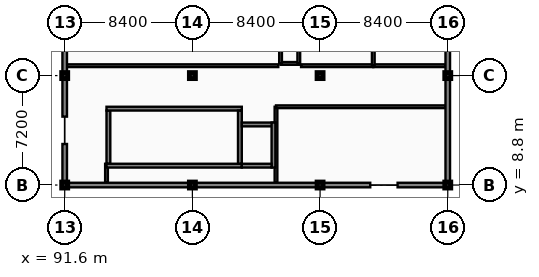
"""IFC4 building model, lengths in metres.
Left out: names, types, materials, properties, quantities, classifications, styles, units other than length and angle.
Written with IfcOpenShell. Run it as: python <this file> out.ifc"""

import sys

from ifc_helpers import new_model, si_unit, direction, frame, frame_2d, origin, origin_2d, place, context, subcontext, project, spatial, rectangle, extrude, element, fill, save


model = new_model("IFC4")
c1 = context("Model", 3, precision=1e-05, world=origin(), true_north=direction((0.0, 1.0)))
c2 = subcontext(c1, "Body", "Model", "MODEL_VIEW")
j1 = project(units=[si_unit("LENGTHUNIT", "METRE"), si_unit("PLANEANGLEUNIT", "RADIAN")], contexts=[c1])
p1 = place(None, origin())
s1 = spatial("IfcSite", under=j1, at=p1, CompositionType="ELEMENT")
p2 = place(p1, origin())
s2 = spatial("IfcBuilding", under=s1, at=p2, CompositionType="ELEMENT")
p3 = place(p2, frame((0.0, 0.0, 9.6)))
s3 = spatial("IfcBuildingStorey", under=s2, at=p3, CompositionType="ELEMENT", Elevation=9.6)
for number, where, z_axis, x_axis in (
    (1, (91.6, 8.8, 0.0), (0.0, 0.0, 1.0), (1.0, 0.0, 0.0)),
    (2, (91.6, 16.0, 0.0), (0.0, 0.0, 1.0), (1.0, 0.0, 0.0)),
    (3, (100.0, 8.8, 0.0), (0.0, 0.0, 1.0), (1.0, 0.0, 0.0)),
    (4, (100.0, 16.0, 0.0), (0.0, 0.0, 1.0), (1.0, 0.0, 0.0)),
    (5, (108.4, 8.8, 0.0), (0.0, 0.0, 1.0), (1.0, 0.0, 0.0)),
    (6, (108.4, 16.0, 0.0), (0.0, 0.0, 1.0), (1.0, 0.0, 0.0)),
    (7, (116.8, 8.8, 0.0), (0.0, 0.0, 1.0), (1.0, 0.0, 0.0)),
    (8, (116.8, 16.0, 0.0), (0.0, 0.0, 1.0), (1.0, 0.0, 0.0)),
):
    element("IfcColumn", number, at=place(p3, frame(where, z_axis=z_axis, x_axis=x_axis)), inside=s3, PredefinedType="COLUMN", context=c2, shape_type="SweptSolid", body=[
        extrude(rectangle(XDim=0.4, YDim=0.4, at=origin_2d()), origin(), (0.0, 0.0, 1.0), 4.2),
    ])
p4 = place(p3, frame((94.35, 8.96, 0.0), z_axis=(0.0, 0.0, 1.0), x_axis=(0.0, 1.0, 0.0)))
e9 = element("IfcWall", 9, at=p4, inside=s3, PredefinedType="PARTITIONING", context=c2, shape_type="SweptSolid", body=[
    extrude(rectangle(XDim=1.24, YDim=0.18, at=frame_2d((0.62, 0.0))), origin(), (0.0, 0.0, 1.0), 3.59),
])
p5 = place(p3, frame((105.5, 8.94, 0.0), z_axis=(0.0, 0.0, 1.0), x_axis=(0.0, 1.0, 0.0)))
e10 = element("IfcWall", 10, at=p5, inside=s3, PredefinedType="PARTITIONING", context=c2, shape_type="SweptSolid", body=[
    extrude(rectangle(XDim=5.01, YDim=0.18, at=frame_2d((2.505, 0.0))), origin(), (0.0, 0.0, 1.0), 3.59),
])
p6 = place(p3, frame((105.5, 13.95, 0.0), z_axis=(0.0, 0.0, 1.0), x_axis=(1.0, 0.0, 0.0)))
e11 = element("IfcWall", 11, at=p6, inside=s3, PredefinedType="PARTITIONING", context=c2, shape_type="SweptSolid", body=[
    extrude(rectangle(XDim=11.16, YDim=0.18, at=frame_2d((5.58, 0.0))), origin(), (0.0, 0.0, 1.0), 3.47),
])
p7 = place(p6, frame((5.08, 0.0, -0.01)))
e12 = element("IfcOpeningElement", 12, at=p7, cuts=e11, PredefinedType="OPENING", context=c2, shape_type="SweptSolid", body=[
    extrude(rectangle(XDim=1.0, YDim=2.16, at=frame_2d((0.5, 1.08))), frame((0.0, 0.1, 0.0), z_axis=(0.0, -1.0, 0.0), x_axis=(1.0, 0.0, 0.0)), (0.0, 0.0, 1.0), 0.2),
])
p8 = place(p3, frame((91.74, 16.65, 0.0), z_axis=(0.0, 0.0, 1.0), x_axis=(1.0, 0.0, 0.0)))
e13 = element("IfcWall", 13, at=p8, inside=s3, PredefinedType="PARTITIONING", context=c2, shape_type="SweptSolid", body=[
    extrude(rectangle(XDim=13.91, YDim=0.18, at=frame_2d((6.955, 0.0))), origin(), (0.0, 0.0, 1.0), 3.47),
])
p9 = place(p8, frame((5.54, 0.0, -0.01)))
e14 = element("IfcOpeningElement", 14, at=p9, cuts=e13, PredefinedType="OPENING", context=c2, shape_type="SweptSolid", body=[
    extrude(rectangle(XDim=1.6, YDim=2.21, at=frame_2d((0.8, 1.105))), frame((0.0, 0.1, 0.0), z_axis=(0.0, -1.0, 0.0), x_axis=(1.0, 0.0, 0.0)), (0.0, 0.0, 1.0), 0.2),
])
p10 = place(p3, frame((107.15, 16.65, 0.0), z_axis=(0.0, 0.0, 1.0), x_axis=(1.0, 0.0, 0.0)))
e15 = element("IfcWall", 15, at=p10, inside=s3, PredefinedType="PARTITIONING", context=c2, shape_type="SweptSolid", body=[
    extrude(rectangle(XDim=4.75, YDim=0.18, at=frame_2d((2.375, 0.0))), origin(), (0.0, 0.0, 1.0), 3.47),
])
p11 = place(p3, frame((111.9, 16.65, 0.0), z_axis=(0.0, 0.0, 1.0), x_axis=(1.0, 0.0, 0.0)))
e16 = element("IfcWall", 16, at=p11, inside=s3, PredefinedType="PARTITIONING", context=c2, shape_type="SweptSolid", body=[
    extrude(rectangle(XDim=4.76, YDim=0.18, at=frame_2d((2.38, 0.0))), origin(), (0.0, 0.0, 1.0), 3.59),
])
p12 = place(p11, frame((1.88, 0.0, -0.01)))
e17 = element("IfcOpeningElement", 17, at=p12, cuts=e16, PredefinedType="OPENING", context=c2, shape_type="SweptSolid", body=[
    extrude(rectangle(XDim=1.0, YDim=2.16, at=frame_2d((0.5, 1.08))), frame((0.0, 0.1, 0.0), z_axis=(0.0, -1.0, 0.0), x_axis=(1.0, 0.0, 0.0)), (0.0, 0.0, 1.0), 0.2),
])
p13 = place(p3, frame((111.9, 16.65, 0.0), z_axis=(0.0, 0.0, 1.0), x_axis=(0.0, 1.0, 0.0)))
e18 = element("IfcWall", 18, at=p13, inside=s3, PredefinedType="PARTITIONING", context=c2, shape_type="SweptSolid", body=[
    extrude(rectangle(XDim=6.41, YDim=0.18, at=frame_2d((3.205, 0.0))), origin(), (0.0, 0.0, 1.0), 3.63),
])
p14 = place(p3, frame((91.6, 8.8, 0.0), z_axis=(0.0, 0.0, 1.0), x_axis=(1.0, 0.0, 0.0)))
e19 = element("IfcWall", 19, at=p14, inside=s3, PredefinedType="SOLIDWALL", context=c2, shape_type="SweptSolid", body=[
    extrude(rectangle(XDim=8.4, YDim=0.3, at=frame_2d((4.2, 0.0))), origin(), (0.0, 0.0, 1.0), 3.59),
])
p15 = place(p14, frame((0.46, 0.0, 0.85)))
e20 = element("IfcOpeningElement", 20, at=p15, cuts=e19, PredefinedType="OPENING", context=c2, shape_type="SweptSolid", body=[
    extrude(rectangle(XDim=0.9, YDim=2.1, at=frame_2d((0.45, 1.05))), frame((0.0, 0.16, 0.0), z_axis=(0.0, -1.0, 0.0), x_axis=(1.0, 0.0, 0.0)), (0.0, 0.0, 1.0), 0.32),
])
p16 = place(p14, frame((6.86, 0.0, 0.85)))
e21 = element("IfcOpeningElement", 21, at=p16, cuts=e19, PredefinedType="OPENING", context=c2, shape_type="SweptSolid", body=[
    extrude(rectangle(XDim=0.9, YDim=2.1, at=frame_2d((0.45, 1.05))), frame((0.0, 0.16, 0.0), z_axis=(0.0, -1.0, 0.0), x_axis=(1.0, 0.0, 0.0)), (0.0, 0.0, 1.0), 0.32),
])
p17 = place(p3, frame((100.0, 8.8, 0.0), z_axis=(0.0, 0.0, 1.0), x_axis=(1.0, 0.0, 0.0)))
e22 = element("IfcWall", 22, at=p17, inside=s3, PredefinedType="SOLIDWALL", context=c2, shape_type="SweptSolid", body=[
    extrude(rectangle(XDim=8.4, YDim=0.3, at=frame_2d((4.2, 0.0))), origin(), (0.0, 0.0, 1.0), 3.47),
])
p18 = place(p17, frame((0.46, 0.0, 0.85)))
e23 = element("IfcOpeningElement", 23, at=p18, cuts=e22, PredefinedType="OPENING", context=c2, shape_type="SweptSolid", body=[
    extrude(rectangle(XDim=0.9, YDim=2.1, at=frame_2d((0.45, 1.05))), frame((0.0, 0.16, 0.0), z_axis=(0.0, -1.0, 0.0), x_axis=(1.0, 0.0, 0.0)), (0.0, 0.0, 1.0), 0.32),
])
p19 = place(p17, frame((6.86, 0.0, 0.85)))
e24 = element("IfcOpeningElement", 24, at=p19, cuts=e22, PredefinedType="OPENING", context=c2, shape_type="SweptSolid", body=[
    extrude(rectangle(XDim=0.9, YDim=2.1, at=frame_2d((0.45, 1.05))), frame((0.0, 0.16, 0.0), z_axis=(0.0, -1.0, 0.0), x_axis=(1.0, 0.0, 0.0)), (0.0, 0.0, 1.0), 0.32),
])
for number, where, z_axis, x_axis in (
    (25, (108.4, 8.8, 0.0), (0.0, 0.0, 1.0), (1.0, 0.0, 0.0)),
    (26, (113.5, 8.8, 0.0), (0.0, 0.0, 1.0), (1.0, 0.0, 0.0)),
):
    element("IfcWall", number, at=place(p3, frame(where, z_axis=z_axis, x_axis=x_axis)), inside=s3, PredefinedType="SOLIDWALL", context=c2, shape_type="SweptSolid", body=[
        extrude(rectangle(XDim=3.3, YDim=0.3, at=frame_2d((1.65, 0.0))), origin(), (0.0, 0.0, 1.0), 3.47),
    ])
for number, where, z_axis, x_axis in (
    (27, (91.6, 16.0, 0.0), (0.0, 0.0, 1.0), (0.0, -1.0, 0.0)),
    (28, (91.6, 11.5, 0.0), (0.0, 0.0, 1.0), (0.0, -1.0, 0.0)),
):
    element("IfcWall", number, at=place(p3, frame(where, z_axis=z_axis, x_axis=x_axis)), inside=s3, PredefinedType="SOLIDWALL", context=c2, shape_type="SweptSolid", body=[
        extrude(rectangle(XDim=2.7, YDim=0.3, at=frame_2d((1.35, 0.0))), origin(), (0.0, 0.0, 1.0), 3.27),
    ])
p20 = place(p3, frame((91.6, 23.2, 0.0), z_axis=(0.0, 0.0, 1.0), x_axis=(0.0, -1.0, 0.0)))
e29 = element("IfcWall", 29, at=p20, inside=s3, PredefinedType="SOLIDWALL", context=c2, shape_type="SweptSolid", body=[
    extrude(rectangle(XDim=7.2, YDim=0.3, at=frame_2d((3.6, 0.0))), origin(), (0.0, 0.0, 1.0), 3.27),
])
p21 = place(p20, frame((0.46, 0.0, 0.85)))
e30 = element("IfcOpeningElement", 30, at=p21, cuts=e29, PredefinedType="OPENING", context=c2, shape_type="SweptSolid", body=[
    extrude(rectangle(XDim=0.9, YDim=2.1, at=frame_2d((0.45, 1.05))), frame((0.0, 0.16, 0.0), z_axis=(0.0, -1.0, 0.0), x_axis=(1.0, 0.0, 0.0)), (0.0, 0.0, 1.0), 0.32),
])
p22 = place(p20, frame((5.26, 0.0, 0.85)))
e31 = element("IfcOpeningElement", 31, at=p22, cuts=e29, PredefinedType="OPENING", context=c2, shape_type="SweptSolid", body=[
    extrude(rectangle(XDim=0.9, YDim=2.1, at=frame_2d((0.45, 1.05))), frame((0.0, 0.16, 0.0), z_axis=(0.0, -1.0, 0.0), x_axis=(1.0, 0.0, 0.0)), (0.0, 0.0, 1.0), 0.32),
])
p23 = place(p3, frame((116.8, 8.8, 0.0), z_axis=(0.0, 0.0, 1.0), x_axis=(0.0, 1.0, 0.0)))
e32 = element("IfcWall", 32, at=p23, inside=s3, PredefinedType="SOLIDWALL", context=c2, shape_type="SweptSolid", body=[
    extrude(rectangle(XDim=7.2, YDim=0.3, at=frame_2d((3.6, 0.0))), origin(), (0.0, 0.0, 1.0), 3.27),
])
p24 = place(p23, frame((0.46, 0.0, 0.85)))
e33 = element("IfcOpeningElement", 33, at=p24, cuts=e32, PredefinedType="OPENING", context=c2, shape_type="SweptSolid", body=[
    extrude(rectangle(XDim=0.9, YDim=2.1, at=frame_2d((0.45, 1.05))), frame((0.0, 0.16, 0.0), z_axis=(0.0, -1.0, 0.0), x_axis=(1.0, 0.0, 0.0)), (0.0, 0.0, 1.0), 0.32),
])
p25 = place(p23, frame((5.66, 0.0, 0.85)))
e34 = element("IfcOpeningElement", 34, at=p25, cuts=e32, PredefinedType="OPENING", context=c2, shape_type="SweptSolid", body=[
    extrude(rectangle(XDim=0.9, YDim=2.1, at=frame_2d((0.45, 1.05))), frame((0.0, 0.16, 0.0), z_axis=(0.0, -1.0, 0.0), x_axis=(1.0, 0.0, 0.0)), (0.0, 0.0, 1.0), 0.32),
])
p26 = place(p3, frame((116.8, 16.0, 0.0), z_axis=(0.0, 0.0, 1.0), x_axis=(0.0, 1.0, 0.0)))
e35 = element("IfcWall", 35, at=p26, inside=s3, PredefinedType="SOLIDWALL", context=c2, shape_type="SweptSolid", body=[
    extrude(rectangle(XDim=7.2, YDim=0.3, at=frame_2d((3.6, 0.0))), origin(), (0.0, 0.0, 1.0), 3.27),
])
p27 = place(p26, frame((0.86, 0.0, 0.85)))
e36 = element("IfcOpeningElement", 36, at=p27, cuts=e35, PredefinedType="OPENING", context=c2, shape_type="SweptSolid", body=[
    extrude(rectangle(XDim=0.9, YDim=2.1, at=frame_2d((0.45, 1.05))), frame((0.0, 0.16, 0.0), z_axis=(0.0, -1.0, 0.0), x_axis=(1.0, 0.0, 0.0)), (0.0, 0.0, 1.0), 0.32),
])
p28 = place(p26, frame((5.66, 0.0, 0.85)))
e37 = element("IfcOpeningElement", 37, at=p28, cuts=e35, PredefinedType="OPENING", context=c2, shape_type="SweptSolid", body=[
    extrude(rectangle(XDim=0.9, YDim=2.1, at=frame_2d((0.45, 1.05))), frame((0.0, 0.16, 0.0), z_axis=(0.0, -1.0, 0.0), x_axis=(1.0, 0.0, 0.0)), (0.0, 0.0, 1.0), 0.32),
])
p29 = place(p3, frame((94.475, 13.7, 0.0), z_axis=(0.0, 0.0, 1.0), x_axis=(0.0, -1.0, 0.0)))
e38 = element("IfcWall", 38, at=p29, inside=s3, PredefinedType="SHEAR", context=c2, shape_type="SweptSolid", body=[
    extrude(rectangle(XDim=3.5, YDim=0.25, at=frame_2d((1.75, 0.0))), origin(), (0.0, 0.0, 1.0), 4.2),
])
p30 = place(p29, frame((1.1, 0.0, -0.01)))
e39 = element("IfcOpeningElement", 39, at=p30, cuts=e38, PredefinedType="OPENING", context=c2, shape_type="SweptSolid", body=[
    extrude(rectangle(XDim=1.3, YDim=2.16, at=frame_2d((0.65, 1.08))), frame((0.0, 0.135, 0.0), z_axis=(0.0, -1.0, 0.0), x_axis=(1.0, 0.0, 0.0)), (0.0, 0.0, 1.0), 0.27),
])
for number, where, z_axis, x_axis in (
    (40, (94.35, 10.075, 0.0), (0.0, 0.0, 1.0), (1.0, 0.0, 0.0)),
    (41, (94.35, 13.825, 0.0), (0.0, 0.0, 1.0), (1.0, 0.0, 0.0)),
):
    element("IfcWall", number, at=place(p3, frame(where, z_axis=z_axis, x_axis=x_axis)), inside=s3, PredefinedType="SHEAR", context=c2, shape_type="SweptSolid", body=[
        extrude(rectangle(XDim=8.9, YDim=0.25, at=frame_2d((4.45, 0.0))), origin(), (0.0, 0.0, 1.0), 4.2),
    ])
p31 = place(p3, frame((103.125, 10.2, 0.0), z_axis=(0.0, 0.0, 1.0), x_axis=(0.0, 1.0, 0.0)))
e42 = element("IfcWall", 42, at=p31, inside=s3, PredefinedType="SHEAR", context=c2, shape_type="SweptSolid", body=[
    extrude(rectangle(XDim=3.5, YDim=0.25, at=frame_2d((1.75, 0.0))), origin(), (0.0, 0.0, 1.0), 4.2),
])
p32 = place(p3, frame((103.25, 12.785, 0.0), z_axis=(0.0, 0.0, 1.0), x_axis=(1.0, 0.0, 0.0)))
e43 = element("IfcWall", 43, at=p32, inside=s3, PredefinedType="SHEAR", context=c2, shape_type="SweptSolid", body=[
    extrude(rectangle(XDim=2.21, YDim=0.25, at=frame_2d((1.105, 0.0))), origin(), (0.0, 0.0, 1.0), 4.2),
])
p33 = place(p3, frame((105.335, 9.95, 0.0), z_axis=(0.0, 0.0, 1.0), x_axis=(0.0, 1.0, 0.0)))
e44 = element("IfcWall", 44, at=p33, inside=s3, PredefinedType="SHEAR", context=c2, shape_type="SweptSolid", body=[
    extrude(rectangle(XDim=2.96, YDim=0.25, at=frame_2d((1.48, 0.0))), origin(), (0.0, 0.0, 1.0), 4.2),
])
p34 = place(p3, frame((103.25, 10.075, 0.0), z_axis=(0.0, 0.0, 1.0), x_axis=(1.0, 0.0, 0.0)))
e45 = element("IfcWall", 45, at=p34, inside=s3, PredefinedType="SHEAR", context=c2, shape_type="SweptSolid", body=[
    extrude(rectangle(XDim=1.96, YDim=0.25, at=frame_2d((0.98, 0.0))), origin(), (0.0, 0.0, 1.0), 4.2),
])
p35 = place(p34, frame((0.43, 0.0, -0.01)))
e46 = element("IfcOpeningElement", 46, at=p35, cuts=e45, PredefinedType="OPENING", context=c2, shape_type="SweptSolid", body=[
    extrude(rectangle(XDim=1.1, YDim=2.16, at=frame_2d((0.55, 1.08))), frame((0.0, 0.135, 0.0), z_axis=(0.0, -1.0, 0.0), x_axis=(1.0, 0.0, 0.0)), (0.0, 0.0, 1.0), 0.27),
])
p36 = place(p3, frame((105.8, 16.8, 0.0), z_axis=(0.0, 0.0, 1.0), x_axis=(1.0, 0.0, 0.0)))
e47 = element("IfcWall", 47, at=p36, inside=s3, PredefinedType="SOLIDWALL", context=c2, shape_type="SweptSolid", body=[
    extrude(rectangle(XDim=1.2, YDim=0.18, at=frame_2d((0.6, 0.0))), origin(), (0.0, 0.0, 1.0), 3.97),
])
p37 = place(p36, frame((0.2, 0.0, -0.01)))
e48 = element("IfcOpeningElement", 48, at=p37, cuts=e47, PredefinedType="OPENING", context=c2, shape_type="SweptSolid", body=[
    extrude(rectangle(XDim=0.8, YDim=2.06, at=frame_2d((0.4, 1.03))), frame((0.0, 0.1, 0.0), z_axis=(0.0, -1.0, 0.0), x_axis=(1.0, 0.0, 0.0)), (0.0, 0.0, 1.0), 0.2),
])
for number, where, z_axis, x_axis in (
    (49, (107.0, 16.8, 0.0), (0.0, 0.0, 1.0), (0.0, 1.0, 0.0)),
    (50, (105.8, 18.0, 0.0), (0.0, 0.0, 1.0), (0.0, -1.0, 0.0)),
):
    element("IfcWall", number, at=place(p3, frame(where, z_axis=z_axis, x_axis=x_axis)), inside=s3, PredefinedType="SOLIDWALL", context=c2, shape_type="SweptSolid", body=[
        extrude(rectangle(XDim=1.2, YDim=0.18, at=frame_2d((0.6, 0.0))), origin(), (0.0, 0.0, 1.0), 3.97),
    ])
p38 = place(p7, frame((0.0, 0.0, 0.01)))
e51 = element("IfcDoor", 51, at=p38, inside=s3, OperationType="SINGLE_SWING_LEFT", PredefinedType="DOOR", context=c2, shape_type="SweptSolid", body=[
    extrude(rectangle(XDim=1.0, YDim=2.15, at=frame_2d((0.5, 1.075))), frame((0.0, 0.025, 0.0), z_axis=(0.0, -1.0, 0.0), x_axis=(1.0, 0.0, 0.0)), (0.0, 0.0, 1.0), 0.05),
])
fill(e12, e51)
p39 = place(p9, frame((1.6, 0.0, 0.01), z_axis=(0.0, 0.0, 1.0), x_axis=(-1.0, 0.0, 0.0)))
e52 = element("IfcDoor", 52, at=p39, inside=s3, OperationType="DOUBLE_SWING_LEFT", PredefinedType="DOOR", context=c2, shape_type="SweptSolid", body=[
    extrude(rectangle(XDim=1.6, YDim=2.2, at=frame_2d((0.8, 1.1))), frame((0.0, 0.025, 0.0), z_axis=(0.0, -1.0, 0.0), x_axis=(1.0, 0.0, 0.0)), (0.0, 0.0, 1.0), 0.05),
])
fill(e14, e52)
p40 = place(p12, frame((0.0, 0.0, 0.01)))
e53 = element("IfcDoor", 53, at=p40, inside=s3, OperationType="SINGLE_SWING_LEFT", PredefinedType="DOOR", context=c2, shape_type="SweptSolid", body=[
    extrude(rectangle(XDim=1.0, YDim=2.15, at=frame_2d((0.5, 1.075))), frame((0.0, 0.025, 0.0), z_axis=(0.0, -1.0, 0.0), x_axis=(1.0, 0.0, 0.0)), (0.0, 0.0, 1.0), 0.05),
])
fill(e17, e53)
p41 = place(p15, origin())
e54 = element("IfcWindow", 54, at=p41, inside=s3, PartitioningType="SINGLE_PANEL", PredefinedType="WINDOW", context=c2, shape_type="SweptSolid", body=[
    extrude(rectangle(XDim=0.9, YDim=2.1, at=frame_2d((0.45, 1.05))), frame((0.0, 0.03, 0.0), z_axis=(0.0, -1.0, 0.0), x_axis=(1.0, 0.0, 0.0)), (0.0, 0.0, 1.0), 0.06),
])
fill(e20, e54)
p42 = place(p16, origin())
e55 = element("IfcWindow", 55, at=p42, inside=s3, PartitioningType="SINGLE_PANEL", PredefinedType="WINDOW", context=c2, shape_type="SweptSolid", body=[
    extrude(rectangle(XDim=0.9, YDim=2.1, at=frame_2d((0.45, 1.05))), frame((0.0, 0.03, 0.0), z_axis=(0.0, -1.0, 0.0), x_axis=(1.0, 0.0, 0.0)), (0.0, 0.0, 1.0), 0.06),
])
fill(e21, e55)
p43 = place(p18, origin())
e56 = element("IfcWindow", 56, at=p43, inside=s3, PartitioningType="SINGLE_PANEL", PredefinedType="WINDOW", context=c2, shape_type="SweptSolid", body=[
    extrude(rectangle(XDim=0.9, YDim=2.1, at=frame_2d((0.45, 1.05))), frame((0.0, 0.03, 0.0), z_axis=(0.0, -1.0, 0.0), x_axis=(1.0, 0.0, 0.0)), (0.0, 0.0, 1.0), 0.06),
])
fill(e23, e56)
p44 = place(p19, origin())
e57 = element("IfcWindow", 57, at=p44, inside=s3, PartitioningType="SINGLE_PANEL", PredefinedType="WINDOW", context=c2, shape_type="SweptSolid", body=[
    extrude(rectangle(XDim=0.9, YDim=2.1, at=frame_2d((0.45, 1.05))), frame((0.0, 0.03, 0.0), z_axis=(0.0, -1.0, 0.0), x_axis=(1.0, 0.0, 0.0)), (0.0, 0.0, 1.0), 0.06),
])
fill(e24, e57)
p45 = place(p22, origin())
e58 = element("IfcWindow", 58, at=p45, inside=s3, PartitioningType="SINGLE_PANEL", PredefinedType="WINDOW", context=c2, shape_type="SweptSolid", body=[
    extrude(rectangle(XDim=0.9, YDim=2.1, at=frame_2d((0.45, 1.05))), frame((0.0, 0.03, 0.0), z_axis=(0.0, -1.0, 0.0), x_axis=(1.0, 0.0, 0.0)), (0.0, 0.0, 1.0), 0.06),
])
fill(e31, e58)
p46 = place(p24, origin())
e59 = element("IfcWindow", 59, at=p46, inside=s3, PartitioningType="SINGLE_PANEL", PredefinedType="WINDOW", context=c2, shape_type="SweptSolid", body=[
    extrude(rectangle(XDim=0.9, YDim=2.1, at=frame_2d((0.45, 1.05))), frame((0.0, 0.03, 0.0), z_axis=(0.0, -1.0, 0.0), x_axis=(1.0, 0.0, 0.0)), (0.0, 0.0, 1.0), 0.06),
])
fill(e33, e59)
p47 = place(p25, origin())
e60 = element("IfcWindow", 60, at=p47, inside=s3, PartitioningType="SINGLE_PANEL", PredefinedType="WINDOW", context=c2, shape_type="SweptSolid", body=[
    extrude(rectangle(XDim=0.9, YDim=2.1, at=frame_2d((0.45, 1.05))), frame((0.0, 0.03, 0.0), z_axis=(0.0, -1.0, 0.0), x_axis=(1.0, 0.0, 0.0)), (0.0, 0.0, 1.0), 0.06),
])
fill(e34, e60)
p48 = place(p27, origin())
e61 = element("IfcWindow", 61, at=p48, inside=s3, PartitioningType="SINGLE_PANEL", PredefinedType="WINDOW", context=c2, shape_type="SweptSolid", body=[
    extrude(rectangle(XDim=0.9, YDim=2.1, at=frame_2d((0.45, 1.05))), frame((0.0, 0.03, 0.0), z_axis=(0.0, -1.0, 0.0), x_axis=(1.0, 0.0, 0.0)), (0.0, 0.0, 1.0), 0.06),
])
fill(e36, e61)
p49 = place(p30, frame((0.0, 0.0, 0.01)))
e62 = element("IfcDoor", 62, at=p49, inside=s3, OperationType="SINGLE_SWING_RIGHT", PredefinedType="DOOR", context=c2, shape_type="SweptSolid", body=[
    extrude(rectangle(XDim=1.3, YDim=2.15, at=frame_2d((0.65, 1.075))), frame((0.0, 0.025, 0.0), z_axis=(0.0, -1.0, 0.0), x_axis=(1.0, 0.0, 0.0)), (0.0, 0.0, 1.0), 0.05),
])
fill(e39, e62)
p50 = place(p35, frame((0.0, 0.0, 0.01)))
e63 = element("IfcDoor", 63, at=p50, inside=s3, OperationType="SLIDING_TO_LEFT", PredefinedType="DOOR", context=c2, shape_type="SweptSolid", body=[
    extrude(rectangle(XDim=1.1, YDim=2.15, at=frame_2d((0.55, 1.075))), frame((0.0, 0.025, 0.0), z_axis=(0.0, -1.0, 0.0), x_axis=(1.0, 0.0, 0.0)), (0.0, 0.0, 1.0), 0.05),
])
fill(e46, e63)
p51 = place(p37, frame((0.0, 0.0, 0.01)))
e64 = element("IfcDoor", 64, at=p51, inside=s3, OperationType="SINGLE_SWING_LEFT", PredefinedType="DOOR", context=c2, shape_type="SweptSolid", body=[
    extrude(rectangle(XDim=0.8, YDim=2.05, at=frame_2d((0.4, 1.025))), frame((0.0, 0.025, 0.0), z_axis=(0.0, -1.0, 0.0), x_axis=(1.0, 0.0, 0.0)), (0.0, 0.0, 1.0), 0.05),
])
fill(e48, e64)
save(model, sys.argv[1])
